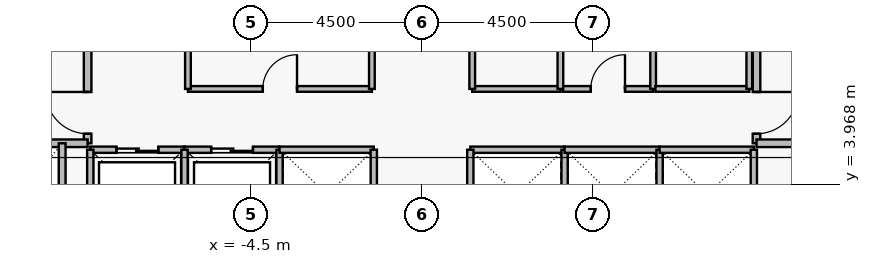
"""IFC4 building model, lengths in metres.
Left out: names, types, materials, properties, quantities, classifications, styles, units other than length and angle.
Written with IfcOpenShell. Run it as: python <this file> out.ifc"""

import sys

from ifc_helpers import new_model, si_unit, direction, frame, frame_2d, origin, place, context, subcontext, project, spatial, rectangle, extrude, element, fill, save


model = new_model("IFC4")
c1 = context("Model", 3, precision=1e-05, world=origin(), true_north=direction((0.0, 1.0)))
c2 = subcontext(c1, "Body", "Model", "MODEL_VIEW")
j1 = project(units=[si_unit("LENGTHUNIT", "METRE"), si_unit("PLANEANGLEUNIT", "RADIAN")], contexts=[c1])
p1 = place(None, origin())
s1 = spatial("IfcSite", under=j1, at=p1, CompositionType="ELEMENT")
p2 = place(p1, origin())
s2 = spatial("IfcBuilding", under=s1, at=p2, CompositionType="ELEMENT")
p3 = place(p2, frame((0.0, 0.0, 99.3)))
s3 = spatial("IfcBuildingStorey", under=s2, at=p3, CompositionType="ELEMENT", Elevation=99.3)
p4 = place(p3, frame((-8.8, 5.05, 0.0), z_axis=(0.0, 0.0, 1.0), x_axis=(0.0, 1.0, 0.0)))
e1 = element("IfcWall", 1, at=p4, inside=s3, PredefinedType="PARTITIONING", context=c2, shape_type="SweptSolid", body=[
    extrude(rectangle(XDim=6.1, YDim=0.2, at=frame_2d((3.05, 0.0))), origin(), (0.0, 0.0, 1.0), 3.43),
])
p5 = place(p4, frame((0.25, 0.0, 0.0)))
e2 = element("IfcOpeningElement", 2, at=p5, cuts=e1, PredefinedType="OPENING", context=c2, shape_type="SweptSolid", body=[
    extrude(rectangle(XDim=1.1, YDim=2.2, at=frame_2d((0.55, 1.1))), frame((0.0, 0.11, 0.0), z_axis=(0.0, -1.0, 0.0), x_axis=(1.0, 0.0, 0.0)), (0.0, 0.0, 1.0), 0.22),
])
p6 = place(p4, frame((3.85, 0.0, 0.0)))
e3 = element("IfcOpeningElement", 3, at=p6, cuts=e1, PredefinedType="OPENING", context=c2, shape_type="SweptSolid", body=[
    extrude(rectangle(XDim=1.1, YDim=2.2, at=frame_2d((0.55, 1.1))), frame((0.0, 0.11, 0.0), z_axis=(0.0, -1.0, 0.0), x_axis=(1.0, 0.0, 0.0)), (0.0, 0.0, 1.0), 0.22),
])
p7 = place(p3, frame((8.8, 11.15, 0.0), z_axis=(0.0, 0.0, 1.0), x_axis=(0.0, -1.0, 0.0)))
e4 = element("IfcWall", 4, at=p7, inside=s3, PredefinedType="PARTITIONING", context=c2, shape_type="SweptSolid", body=[
    extrude(rectangle(XDim=6.1, YDim=0.2, at=frame_2d((3.05, 0.0))), origin(), (0.0, 0.0, 1.0), 3.43),
])
p8 = place(p7, frame((1.15, 0.0, 0.0)))
e5 = element("IfcOpeningElement", 5, at=p8, cuts=e4, PredefinedType="OPENING", context=c2, shape_type="SweptSolid", body=[
    extrude(rectangle(XDim=1.1, YDim=2.2, at=frame_2d((0.55, 1.1))), frame((0.0, 0.11, 0.0), z_axis=(0.0, -1.0, 0.0), x_axis=(1.0, 0.0, 0.0)), (0.0, 0.0, 1.0), 0.22),
])
p9 = place(p7, frame((4.75, 0.0, 0.0)))
e6 = element("IfcOpeningElement", 6, at=p9, cuts=e4, PredefinedType="OPENING", context=c2, shape_type="SweptSolid", body=[
    extrude(rectangle(XDim=1.1, YDim=2.2, at=frame_2d((0.55, 1.1))), frame((0.0, 0.11, 0.0), z_axis=(0.0, -1.0, 0.0), x_axis=(1.0, 0.0, 0.0)), (0.0, 0.0, 1.0), 0.22),
])
p10 = place(p3, frame((-8.73, 4.88, 0.0), z_axis=(0.0, 0.0, 1.0), x_axis=(1.0, 0.0, 0.0)))
e7 = element("IfcWall", 7, at=p10, inside=s3, PredefinedType="PARTITIONING", context=c2, shape_type="SweptSolid", body=[
    extrude(rectangle(XDim=2.48, YDim=0.165, at=frame_2d((1.24, 0.0))), origin(), (0.0, 0.0, 1.0), 3.43),
])
p11 = place(p10, frame((0.69, 0.0, 0.0)))
e8 = element("IfcOpeningElement", 8, at=p11, cuts=e7, PredefinedType="OPENING", context=c2, shape_type="SweptSolid", body=[
    extrude(rectangle(XDim=1.1, YDim=2.25, at=frame_2d((0.55, 1.125))), frame((0.0, 0.093, 0.0), z_axis=(0.0, -1.0, 0.0), x_axis=(1.0, 0.0, 0.0)), (0.0, 0.0, 1.0), 0.185),
])
p12 = place(p3, frame((-6.25, 4.88, 0.0), z_axis=(0.0, 0.0, 1.0), x_axis=(1.0, 0.0, 0.0)))
e9 = element("IfcWall", 9, at=p12, inside=s3, PredefinedType="PARTITIONING", context=c2, shape_type="SweptSolid", body=[
    extrude(rectangle(XDim=2.5, YDim=0.165, at=frame_2d((1.25, 0.0))), origin(), (0.0, 0.0, 1.0), 3.43),
])
p13 = place(p12, frame((0.7, 0.0, 0.0)))
e10 = element("IfcOpeningElement", 10, at=p13, cuts=e9, PredefinedType="OPENING", context=c2, shape_type="SweptSolid", body=[
    extrude(rectangle(XDim=1.1, YDim=2.25, at=frame_2d((0.55, 1.125))), frame((0.0, 0.093, 0.0), z_axis=(0.0, -1.0, 0.0), x_axis=(1.0, 0.0, 0.0)), (0.0, 0.0, 1.0), 0.185),
])
p14 = place(p3, frame((-6.16, 6.48, 0.0), z_axis=(0.0, 0.0, 1.0), x_axis=(1.0, 0.0, 0.0)))
e11 = element("IfcWall", 11, at=p14, inside=s3, PredefinedType="PARTITIONING", context=c2, shape_type="SweptSolid", body=[
    extrude(rectangle(XDim=4.84, YDim=0.15, at=frame_2d((2.42, 0.0))), origin(), (0.0, 0.0, 1.0), 3.43),
])
p15 = place(p14, frame((1.97, 0.0, 0.0)))
e12 = element("IfcOpeningElement", 12, at=p15, cuts=e11, PredefinedType="OPENING", context=c2, shape_type="SweptSolid", body=[
    extrude(rectangle(XDim=0.9, YDim=2.15, at=frame_2d((0.45, 1.075))), frame((0.0, 0.085, 0.0), z_axis=(0.0, -1.0, 0.0), x_axis=(1.0, 0.0, 0.0)), (0.0, 0.0, 1.0), 0.17),
])
p16 = place(p3, frame((3.7, 6.48, 0.0), z_axis=(0.0, 0.0, 1.0), x_axis=(1.0, 0.0, 0.0)))
e13 = element("IfcWall", 13, at=p16, inside=s3, PredefinedType="PARTITIONING", context=c2, shape_type="SweptSolid", body=[
    extrude(rectangle(XDim=2.38, YDim=0.15, at=frame_2d((1.19, 0.0))), origin(), (0.0, 0.0, 1.0), 3.43),
])
p17 = place(p16, frame((0.74, 0.0, 0.0)))
e14 = element("IfcOpeningElement", 14, at=p17, cuts=e13, PredefinedType="OPENING", context=c2, shape_type="SweptSolid", body=[
    extrude(rectangle(XDim=0.9, YDim=2.15, at=frame_2d((0.45, 1.075))), frame((0.0, 0.085, 0.0), z_axis=(0.0, -1.0, 0.0), x_axis=(1.0, 0.0, 0.0)), (0.0, 0.0, 1.0), 0.17),
])
for number, where, z_axis, x_axis in (
    (15, (-11.65, 5.05, 0.0), (0.0, 0.0, 1.0), (1.0, 0.0, 0.0)),
    (16, (8.8, 5.05, 0.0), (0.0, 0.0, 1.0), (1.0, 0.0, 0.0)),
):
    element("IfcWall", number, at=place(p3, frame(where, z_axis=z_axis, x_axis=x_axis)), inside=s3, PredefinedType="PARTITIONING", context=c2, shape_type="SweptSolid", body=[
        extrude(rectangle(XDim=2.85, YDim=0.2, at=frame_2d((1.425, 0.0))), origin(), (0.0, 0.0, 1.0), 3.43),
    ])
for number, where, z_axis, x_axis in (
    (17, (-8.73, 2.52, 0.0), (0.0, 0.0, 1.0), (0.0, 1.0, 0.0)),
    (18, (-6.25, 2.52, 0.0), (0.0, 0.0, 1.0), (0.0, 1.0, 0.0)),
    (19, (-3.75, 2.52, 0.0), (0.0, 0.0, 1.0), (0.0, 1.0, 0.0)),
):
    element("IfcWall", number, at=place(p3, frame(where, z_axis=z_axis, x_axis=x_axis)), inside=s3, PredefinedType="PARTITIONING", context=c2, shape_type="SweptSolid", body=[
        extrude(rectangle(XDim=2.36, YDim=0.165, at=frame_2d((1.18, 0.0))), origin(), (0.0, 0.0, 1.0), 3.43),
    ])
p18 = place(p3, frame((-3.75, 4.88, 0.0), z_axis=(0.0, 0.0, 1.0), x_axis=(1.0, 0.0, 0.0)))
e20 = element("IfcWall", 20, at=p18, inside=s3, PredefinedType="PARTITIONING", context=c2, shape_type="SweptSolid", body=[
    extrude(rectangle(XDim=2.48, YDim=0.165, at=frame_2d((1.24, 0.0))), origin(), (0.0, 0.0, 1.0), 3.43),
])
p19 = place(p3, frame((-1.27, 2.52, 0.0), z_axis=(0.0, 0.0, 1.0), x_axis=(0.0, 1.0, 0.0)))
e21 = element("IfcWall", 21, at=p19, inside=s3, PredefinedType="PARTITIONING", context=c2, shape_type="SweptSolid", body=[
    extrude(rectangle(XDim=2.36, YDim=0.165, at=frame_2d((1.18, 0.0))), origin(), (0.0, 0.0, 1.0), 3.43),
])
p20 = place(p3, frame((1.27, 4.88, 0.0), z_axis=(0.0, 0.0, 1.0), x_axis=(1.0, 0.0, 0.0)))
e22 = element("IfcWall", 22, at=p20, inside=s3, PredefinedType="PARTITIONING", context=c2, shape_type="SweptSolid", body=[
    extrude(rectangle(XDim=2.48, YDim=0.165, at=frame_2d((1.24, 0.0))), origin(), (0.0, 0.0, 1.0), 3.43),
])
for number, where, z_axis, x_axis in (
    (23, (1.27, 2.52, 0.0), (0.0, 0.0, 1.0), (0.0, 1.0, 0.0)),
    (24, (3.75, 2.52, 0.0), (0.0, 0.0, 1.0), (0.0, 1.0, 0.0)),
):
    element("IfcWall", number, at=place(p3, frame(where, z_axis=z_axis, x_axis=x_axis)), inside=s3, PredefinedType="PARTITIONING", context=c2, shape_type="SweptSolid", body=[
        extrude(rectangle(XDim=2.36, YDim=0.165, at=frame_2d((1.18, 0.0))), origin(), (0.0, 0.0, 1.0), 3.43),
    ])
p21 = place(p3, frame((3.75, 4.88, 0.0), z_axis=(0.0, 0.0, 1.0), x_axis=(1.0, 0.0, 0.0)))
e25 = element("IfcWall", 25, at=p21, inside=s3, PredefinedType="PARTITIONING", context=c2, shape_type="SweptSolid", body=[
    extrude(rectangle(XDim=2.5, YDim=0.165, at=frame_2d((1.25, 0.0))), origin(), (0.0, 0.0, 1.0), 3.43),
])
p22 = place(p3, frame((6.25, 2.52, 0.0), z_axis=(0.0, 0.0, 1.0), x_axis=(0.0, 1.0, 0.0)))
e26 = element("IfcWall", 26, at=p22, inside=s3, PredefinedType="PARTITIONING", context=c2, shape_type="SweptSolid", body=[
    extrude(rectangle(XDim=2.36, YDim=0.165, at=frame_2d((1.18, 0.0))), origin(), (0.0, 0.0, 1.0), 3.43),
])
p23 = place(p3, frame((6.25, 4.88, 0.0), z_axis=(0.0, 0.0, 1.0), x_axis=(1.0, 0.0, 0.0)))
e27 = element("IfcWall", 27, at=p23, inside=s3, PredefinedType="PARTITIONING", context=c2, shape_type="SweptSolid", body=[
    extrude(rectangle(XDim=2.48, YDim=0.165, at=frame_2d((1.24, 0.0))), origin(), (0.0, 0.0, 1.0), 3.43),
])
p24 = place(p3, frame((8.73, 2.52, 0.0), z_axis=(0.0, 0.0, 1.0), x_axis=(0.0, 1.0, 0.0)))
e28 = element("IfcWall", 28, at=p24, inside=s3, PredefinedType="PARTITIONING", context=c2, shape_type="SweptSolid", body=[
    extrude(rectangle(XDim=2.36, YDim=0.165, at=frame_2d((1.18, 0.0))), origin(), (0.0, 0.0, 1.0), 3.43),
])
p25 = place(p3, frame((-9.47, 2.45, 0.0), z_axis=(0.0, 0.0, 1.0), x_axis=(0.0, 1.0, 0.0)))
e29 = element("IfcWall", 29, at=p25, inside=s3, PredefinedType="PARTITIONING", context=c2, shape_type="SweptSolid", body=[
    extrude(rectangle(XDim=2.6, YDim=0.18, at=frame_2d((1.3, 0.0))), origin(), (0.0, 0.0, 1.0), 3.43),
])
for number, where, z_axis, x_axis in (
    (30, (-6.16, 6.48, 0.0), (0.0, 0.0, 1.0), (0.0, 1.0, 0.0)),
    (31, (-1.32, 6.48, 0.0), (0.0, 0.0, 1.0), (0.0, 1.0, 0.0)),
):
    element("IfcWall", number, at=place(p3, frame(where, z_axis=z_axis, x_axis=x_axis)), inside=s3, PredefinedType="PARTITIONING", context=c2, shape_type="SweptSolid", body=[
        extrude(rectangle(XDim=2.24, YDim=0.15, at=frame_2d((1.12, 0.0))), origin(), (0.0, 0.0, 1.0), 3.43),
    ])
p26 = place(p3, frame((1.32, 6.48, 0.0), z_axis=(0.0, 0.0, 1.0), x_axis=(1.0, 0.0, 0.0)))
e32 = element("IfcWall", 32, at=p26, inside=s3, PredefinedType="PARTITIONING", context=c2, shape_type="SweptSolid", body=[
    extrude(rectangle(XDim=2.32, YDim=0.15, at=frame_2d((1.16, 0.0))), origin(), (0.0, 0.0, 1.0), 3.43),
])
for number, where, z_axis, x_axis in (
    (33, (1.32, 6.48, 0.0), (0.0, 0.0, 1.0), (0.0, 1.0, 0.0)),
    (34, (3.64, 6.48, 0.0), (0.0, 0.0, 1.0), (0.0, 1.0, 0.0)),
    (35, (6.08, 6.48, 0.0), (0.0, 0.0, 1.0), (0.0, 1.0, 0.0)),
):
    element("IfcWall", number, at=place(p3, frame(where, z_axis=z_axis, x_axis=x_axis)), inside=s3, PredefinedType="PARTITIONING", context=c2, shape_type="SweptSolid", body=[
        extrude(rectangle(XDim=2.24, YDim=0.15, at=frame_2d((1.12, 0.0))), origin(), (0.0, 0.0, 1.0), 3.43),
    ])
p27 = place(p3, frame((6.14, 6.48, 0.0), z_axis=(0.0, 0.0, 1.0), x_axis=(1.0, 0.0, 0.0)))
e36 = element("IfcWall", 36, at=p27, inside=s3, PredefinedType="PARTITIONING", context=c2, shape_type="SweptSolid", body=[
    extrude(rectangle(XDim=2.47, YDim=0.15, at=frame_2d((1.235, 0.0))), origin(), (0.0, 0.0, 1.0), 3.43),
])
p28 = place(p3, frame((8.61, 6.48, 0.0), z_axis=(0.0, 0.0, 1.0), x_axis=(0.0, 1.0, 0.0)))
e37 = element("IfcWall", 37, at=p28, inside=s3, PredefinedType="PARTITIONING", context=c2, shape_type="SweptSolid", body=[
    extrude(rectangle(XDim=2.24, YDim=0.15, at=frame_2d((1.12, 0.0))), origin(), (0.0, 0.0, 1.0), 3.43),
])
p29 = place(p5, origin())
e38 = element("IfcDoor", 38, at=p29, inside=s3, OperationType="SINGLE_SWING_RIGHT", PredefinedType="DOOR", context=c2, shape_type="SweptSolid", body=[
    extrude(rectangle(XDim=1.1, YDim=2.2, at=frame_2d((0.55, 1.1))), frame((0.0, 0.025, 0.0), z_axis=(0.0, -1.0, 0.0), x_axis=(1.0, 0.0, 0.0)), (0.0, 0.0, 1.0), 0.05),
])
fill(e2, e38)
p30 = place(p9, origin())
e39 = element("IfcDoor", 39, at=p30, inside=s3, OperationType="SINGLE_SWING_LEFT", PredefinedType="DOOR", context=c2, shape_type="SweptSolid", body=[
    extrude(rectangle(XDim=1.1, YDim=2.2, at=frame_2d((0.55, 1.1))), frame((0.0, 0.025, 0.0), z_axis=(0.0, -1.0, 0.0), x_axis=(1.0, 0.0, 0.0)), (0.0, 0.0, 1.0), 0.05),
])
fill(e6, e39)
p31 = place(p11, origin())
e40 = element("IfcDoor", 40, at=p31, inside=s3, OperationType="SLIDING_TO_LEFT", PredefinedType="DOOR", context=c2, shape_type="SweptSolid", body=[
    extrude(rectangle(XDim=1.1, YDim=2.25, at=frame_2d((0.55, 1.125))), frame((0.0, 0.025, 0.0), z_axis=(0.0, -1.0, 0.0), x_axis=(1.0, 0.0, 0.0)), (0.0, 0.0, 1.0), 0.05),
])
fill(e8, e40)
p32 = place(p13, origin())
e41 = element("IfcDoor", 41, at=p32, inside=s3, OperationType="SLIDING_TO_LEFT", PredefinedType="DOOR", context=c2, shape_type="SweptSolid", body=[
    extrude(rectangle(XDim=1.1, YDim=2.25, at=frame_2d((0.55, 1.125))), frame((0.0, 0.025, 0.0), z_axis=(0.0, -1.0, 0.0), x_axis=(1.0, 0.0, 0.0)), (0.0, 0.0, 1.0), 0.05),
])
fill(e10, e41)
p33 = place(p15, origin())
e42 = element("IfcDoor", 42, at=p33, inside=s3, OperationType="SINGLE_SWING_RIGHT", PredefinedType="DOOR", context=c2, shape_type="SweptSolid", body=[
    extrude(rectangle(XDim=0.9, YDim=2.15, at=frame_2d((0.45, 1.075))), frame((0.0, 0.025, 0.0), z_axis=(0.0, -1.0, 0.0), x_axis=(1.0, 0.0, 0.0)), (0.0, 0.0, 1.0), 0.05),
])
fill(e12, e42)
p34 = place(p17, origin())
e43 = element("IfcDoor", 43, at=p34, inside=s3, OperationType="SINGLE_SWING_RIGHT", PredefinedType="DOOR", context=c2, shape_type="SweptSolid", body=[
    extrude(rectangle(XDim=0.9, YDim=2.15, at=frame_2d((0.45, 1.075))), frame((0.0, 0.025, 0.0), z_axis=(0.0, -1.0, 0.0), x_axis=(1.0, 0.0, 0.0)), (0.0, 0.0, 1.0), 0.05),
])
fill(e14, e43)
save(model, sys.argv[1])
